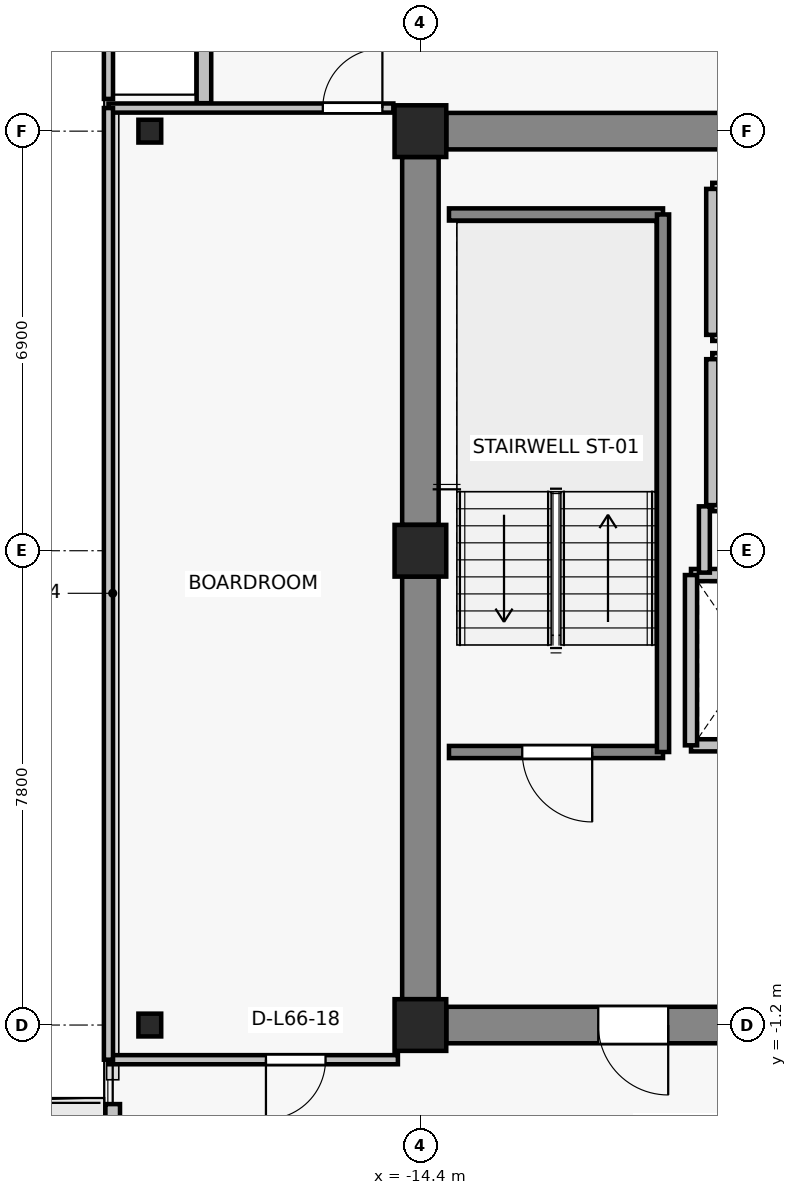
"""IFC4 building model, lengths in metres.
Left out: names, types, materials, properties, quantities, classifications, styles, units other than length and angle.
Written with IfcOpenShell. Run it as: python <this file> out.ifc"""

import sys

from ifc_helpers import new_model, si_unit, direction, frame, frame_2d, origin, origin_2d, place, context, subcontext, project, spatial, rectangle, i_section, extrude, source, transform, mapped, element, fill, save


model = new_model("IFC4")
c1 = context("Model", 3, precision=1e-05, world=origin(), true_north=direction((0.0, 1.0)))
c2 = subcontext(c1, "Body", "Model", "MODEL_VIEW")
j1 = project(units=[si_unit("LENGTHUNIT", "METRE"), si_unit("PLANEANGLEUNIT", "RADIAN")], contexts=[c1])
p1 = place(None, origin())
s1 = spatial("IfcSite", under=j1, at=p1, CompositionType="ELEMENT")
p2 = place(p1, origin())
s2 = spatial("IfcBuilding", under=s1, at=p2, CompositionType="ELEMENT")
p3 = place(p2, frame((0.0, 0.0, 235.3)))
s3 = spatial("IfcBuildingStorey", under=s2, at=p3, CompositionType="ELEMENT", Elevation=235.3)
for number, where, z_axis, x_axis in (
    (1, (-14.4, -1.2, 0.0), (0.0, 0.0, 1.0), (1.0, 0.0, 0.0)),
    (2, (-14.4, 6.6, 0.0), (0.0, 0.0, 1.0), (1.0, 0.0, 0.0)),
    (3, (-14.4, 13.5, 0.0), (0.0, 0.0, 1.0), (1.0, 0.0, 0.0)),
):
    element("IfcColumn", number, at=place(p3, frame(where, z_axis=z_axis, x_axis=x_axis)), inside=s3, PredefinedType="COLUMN", context=c2, shape_type="SweptSolid", body=[
        extrude(rectangle(XDim=0.85, YDim=0.85, at=origin_2d()), origin(), (0.0, 0.0, 1.0), 3.3),
    ])
for number, where, z_axis, x_axis in (
    (4, (-18.85, -1.2, 0.0), (0.0, 0.0, 1.0), (1.0, 0.0, 0.0)),
    (5, (-18.85, 13.5, 0.0), (0.0, 0.0, 1.0), (1.0, 0.0, 0.0)),
):
    element("IfcColumn", number, at=place(p3, frame(where, z_axis=z_axis, x_axis=x_axis)), inside=s3, PredefinedType="COLUMN", context=c2, shape_type="SweptSolid", body=[
        extrude(i_section(OverallWidth=0.375, OverallDepth=0.375, WebThickness=0.017, FlangeThickness=0.027, FilletRadius=0.015, at=origin_2d()), origin(), (0.0, 0.0, 1.0), 3.3),
    ])
p4 = place(p3, frame((-13.975, 13.5, 0.0), z_axis=(0.0, 0.0, 1.0), x_axis=(1.0, 0.0, 0.0)))
e6 = element("IfcWall", 6, at=p4, inside=s3, PredefinedType="SHEAR", context=c2, shape_type="SweptSolid", body=[
    extrude(rectangle(XDim=6.35, YDim=0.6, at=frame_2d((3.175, 0.0))), origin(), (0.0, 0.0, 1.0), 3.075),
])
p5 = place(p3, frame((-14.4, -0.775, 0.0), z_axis=(0.0, 0.0, 1.0), x_axis=(0.0, 1.0, 0.0)))
e7 = element("IfcWall", 7, at=p5, inside=s3, PredefinedType="SHEAR", context=c2, shape_type="SweptSolid", body=[
    extrude(rectangle(XDim=6.95, YDim=0.6, at=frame_2d((3.475, 0.0))), origin(), (0.0, 0.0, 1.0), 3.075),
])
p6 = place(p3, frame((-14.4, 7.025, 0.0), z_axis=(0.0, 0.0, 1.0), x_axis=(0.0, 1.0, 0.0)))
e8 = element("IfcWall", 8, at=p6, inside=s3, PredefinedType="SHEAR", context=c2, shape_type="SweptSolid", body=[
    extrude(rectangle(XDim=6.05, YDim=0.6, at=frame_2d((3.025, 0.0))), origin(), (0.0, 0.0, 1.0), 3.075),
])
p7 = place(p3, frame((-7.625, -1.2, 0.0), z_axis=(0.0, 0.0, 1.0), x_axis=(-1.0, 0.0, 0.0)))
e9 = element("IfcWall", 9, at=p7, inside=s3, PredefinedType="SHEAR", context=c2, shape_type="SweptSolid", body=[
    extrude(rectangle(XDim=6.35, YDim=0.6, at=frame_2d((3.175, 0.0))), origin(), (0.0, 0.0, 1.0), 3.075),
])
p8 = place(p7, frame((2.7, 0.0, 0.0)))
e10 = element("IfcOpeningElement", 10, at=p8, cuts=e9, PredefinedType="OPENING", context=c2, shape_type="SweptSolid", body=[
    extrude(rectangle(XDim=1.15, YDim=2.15, at=frame_2d((0.575, 1.075))), frame((0.0, 0.31, 0.0), z_axis=(0.0, -1.0, 0.0), x_axis=(1.0, 0.0, 0.0)), (0.0, 0.0, 1.0), 0.62),
])
p9 = place(p3, frame((-19.46, -8.3, 0.0), z_axis=(0.0, 0.0, 1.0), x_axis=(0.0, 1.0, 0.0)))
e11 = element("IfcWall", 11, at=p9, inside=s3, PredefinedType="SOLIDWALL", context=c2, shape_type="SweptSolid", body=[
    extrude(rectangle(XDim=5.8, YDim=0.24, at=frame_2d((2.9, 0.0))), origin(), (0.0, 0.0, 1.0), 3.075),
])
p10 = place(p9, frame((0.696, 0.0, 0.0)))
e12 = element("IfcOpeningElement", 12, at=p10, cuts=e11, PredefinedType="OPENING", context=c2, shape_type="SweptSolid", body=[
    extrude(rectangle(XDim=1.0, YDim=2.2, at=frame_2d((0.5, 1.1))), frame((0.0, 0.13, 0.0), z_axis=(0.0, -1.0, 0.0), x_axis=(1.0, 0.0, 0.0)), (0.0, 0.0, 1.0), 0.26),
])
p11 = place(p9, frame((2.046, 0.0, 0.85)))
e13 = element("IfcOpeningElement", 13, at=p11, cuts=e11, PredefinedType="OPENING", context=c2, shape_type="SweptSolid", body=[
    extrude(rectangle(XDim=1.5, YDim=1.6, at=frame_2d((0.75, 0.8))), frame((0.0, 0.13, 0.0), z_axis=(0.0, -1.0, 0.0), x_axis=(1.0, 0.0, 0.0)), (0.0, 0.0, 1.0), 0.26),
])
p12 = place(p3, frame((-17.96, 15.46, 0.0), z_axis=(0.0, 0.0, 1.0), x_axis=(0.0, -1.0, 0.0)))
e14 = element("IfcWall", 14, at=p12, inside=s3, PredefinedType="SOLIDWALL", context=c2, shape_type="SweptSolid", body=[
    extrude(rectangle(XDim=1.5, YDim=0.24, at=frame_2d((0.75, 0.0))), origin(), (0.0, 0.0, 1.0), 3.075),
])
p13 = place(p3, frame((-7.95, 3.4, 0.0), z_axis=(0.0, 0.0, 1.0), x_axis=(-1.0, 0.0, 0.0)))
e15 = element("IfcWall", 15, at=p13, inside=s3, PredefinedType="SOLIDWALL", context=c2, shape_type="SweptSolid", body=[
    extrude(rectangle(XDim=2.0, YDim=0.2, at=frame_2d((1.0, 0.0))), origin(), (0.0, 0.0, 1.0), 3.075),
])
p14 = place(p13, frame((0.45, 0.0, 0.0)))
e16 = element("IfcOpeningElement", 16, at=p14, cuts=e15, PredefinedType="OPENING", context=c2, shape_type="SweptSolid", body=[
    extrude(rectangle(XDim=1.1, YDim=2.2, at=frame_2d((0.55, 1.1))), frame((0.0, 0.11, 0.0), z_axis=(0.0, -1.0, 0.0), x_axis=(1.0, 0.0, 0.0)), (0.0, 0.0, 1.0), 0.22),
])
p15 = place(p3, frame((-9.95, 6.2, 0.0), z_axis=(0.0, 0.0, 1.0), x_axis=(1.0, 0.0, 0.0)))
e17 = element("IfcWall", 17, at=p15, inside=s3, PredefinedType="SOLIDWALL", context=c2, shape_type="SweptSolid", body=[
    extrude(rectangle(XDim=2.0, YDim=0.2, at=frame_2d((1.0, 0.0))), origin(), (0.0, 0.0, 1.0), 3.075),
])
p16 = place(p3, frame((-9.95, 3.4, 0.0), z_axis=(0.0, 0.0, 1.0), x_axis=(0.0, 1.0, 0.0)))
e18 = element("IfcWall", 18, at=p16, inside=s3, PredefinedType="SOLIDWALL", context=c2, shape_type="SweptSolid", body=[
    extrude(rectangle(XDim=2.8, YDim=0.2, at=frame_2d((1.4, 0.0))), origin(), (0.0, 0.0, 1.0), 3.075),
])
for number, where, z_axis, x_axis in (
    (19, (-7.4, 7.35, 0.0), (0.0, 0.0, 1.0), (-1.0, 0.0, 0.0)),
    (20, (-9.6, 9.75, 0.0), (0.0, 0.0, 1.0), (1.0, 0.0, 0.0)),
):
    element("IfcWall", number, at=place(p3, frame(where, z_axis=z_axis, x_axis=x_axis)), inside=s3, PredefinedType="SOLIDWALL", context=c2, shape_type="SweptSolid", body=[
        extrude(rectangle(XDim=2.2, YDim=0.2, at=frame_2d((1.1, 0.0))), origin(), (0.0, 0.0, 1.0), 2.615),
    ])
p17 = place(p3, frame((-9.6, 7.35, 0.0), z_axis=(0.0, 0.0, 1.0), x_axis=(0.0, 1.0, 0.0)))
e21 = element("IfcWall", 21, at=p17, inside=s3, PredefinedType="SOLIDWALL", context=c2, shape_type="SweptSolid", body=[
    extrude(rectangle(XDim=2.4, YDim=0.2, at=frame_2d((1.2, 0.0))), origin(), (0.0, 0.0, 1.0), 3.075),
])
for number, where, z_axis, x_axis in (
    (22, (-7.4, 10.15, 0.0), (0.0, 0.0, 1.0), (-1.0, 0.0, 0.0)),
    (23, (-9.6, 12.55, 0.0), (0.0, 0.0, 1.0), (1.0, 0.0, 0.0)),
):
    element("IfcWall", number, at=place(p3, frame(where, z_axis=z_axis, x_axis=x_axis)), inside=s3, PredefinedType="SOLIDWALL", context=c2, shape_type="SweptSolid", body=[
        extrude(rectangle(XDim=2.2, YDim=0.2, at=frame_2d((1.1, 0.0))), origin(), (0.0, 0.0, 1.0), 2.615),
    ])
p18 = place(p3, frame((-9.6, 10.15, 0.0), z_axis=(0.0, 0.0, 1.0), x_axis=(0.0, 1.0, 0.0)))
e24 = element("IfcWall", 24, at=p18, inside=s3, PredefinedType="SOLIDWALL", context=c2, shape_type="SweptSolid", body=[
    extrude(rectangle(XDim=2.4, YDim=0.2, at=frame_2d((1.2, 0.0))), origin(), (0.0, 0.0, 1.0), 3.075),
])
p19 = place(p3, frame((-10.41, 3.29, 0.0), z_axis=(0.0, 0.0, 1.0), x_axis=(-1.0, 0.0, 0.0)))
e25 = element("IfcWall", 25, at=p19, inside=s3, PredefinedType="SOLIDWALL", context=c2, shape_type="SweptSolid", body=[
    extrude(rectangle(XDim=3.52, YDim=0.2, at=frame_2d((1.76, 0.0))), origin(), (0.0, 0.0, 1.0), 3.075),
])
p20 = place(p19, frame((1.165, 0.0, 0.0)))
e26 = element("IfcOpeningElement", 26, at=p20, cuts=e25, PredefinedType="OPENING", context=c2, shape_type="SweptSolid", body=[
    extrude(rectangle(XDim=1.15, YDim=2.15, at=frame_2d((0.575, 1.075))), frame((0.0, 0.11, 0.0), z_axis=(0.0, -1.0, 0.0), x_axis=(1.0, 0.0, 0.0)), (0.0, 0.0, 1.0), 0.22),
])
p21 = place(p3, frame((-13.93, 12.13, 0.0), z_axis=(0.0, 0.0, 1.0), x_axis=(1.0, 0.0, 0.0)))
e27 = element("IfcWall", 27, at=p21, inside=s3, PredefinedType="SOLIDWALL", context=c2, shape_type="SweptSolid", body=[
    extrude(rectangle(XDim=3.52, YDim=0.2, at=frame_2d((1.76, 0.0))), origin(), (0.0, 0.0, 1.0), 3.075),
])
p22 = place(p3, frame((-10.41, 12.13, 0.0), z_axis=(0.0, 0.0, 1.0), x_axis=(0.0, -1.0, 0.0)))
e28 = element("IfcWall", 28, at=p22, inside=s3, PredefinedType="SOLIDWALL", context=c2, shape_type="SweptSolid", body=[
    extrude(rectangle(XDim=8.84, YDim=0.2, at=frame_2d((4.42, 0.0))), origin(), (0.0, 0.0, 1.0), 3.075),
])
p23 = place(p3, frame((-9.73, 6.24, 0.0), z_axis=(0.0, 0.0, 1.0), x_axis=(0.0, 1.0, 0.0)))
e29 = element("IfcWall", 29, at=p23, inside=s3, PredefinedType="PARTITIONING", context=c2, shape_type="SweptSolid", body=[
    extrude(rectangle(XDim=1.09, YDim=0.18, at=frame_2d((0.545, 0.0))), origin(), (0.0, 0.0, 1.0), 3.075),
])
p24 = place(p3, frame((-14.77, -1.77, 0.0), z_axis=(0.0, 0.0, 1.0), x_axis=(-1.0, 0.0, 0.0)))
e30 = element("IfcWall", 30, at=p24, inside=s3, PredefinedType="PARTITIONING", context=c2, shape_type="SweptSolid", body=[
    extrude(rectangle(XDim=4.76, YDim=0.15, at=frame_2d((2.38, 0.0))), origin(), (0.0, 0.0, 1.0), 2.765),
])
p25 = place(p24, frame((1.19, 0.0, 0.0)))
e31 = element("IfcOpeningElement", 31, at=p25, cuts=e30, PredefinedType="OPENING", context=c2, shape_type="SweptSolid", body=[
    extrude(rectangle(XDim=0.98, YDim=2.15, at=frame_2d((0.49, 1.075))), frame((0.0, 0.085, 0.0), z_axis=(0.0, -1.0, 0.0), x_axis=(1.0, 0.0, 0.0)), (0.0, 0.0, 1.0), 0.17),
])
p26 = place(p3, frame((-19.53, 13.88, 0.0), z_axis=(0.0, 0.0, 1.0), x_axis=(1.0, 0.0, 0.0)))
e32 = element("IfcWall", 32, at=p26, inside=s3, PredefinedType="PARTITIONING", context=c2, shape_type="SweptSolid", body=[
    extrude(rectangle(XDim=4.685, YDim=0.15, at=frame_2d((2.343, 0.0))), origin(), (0.0, 0.0, 1.0), 3.075),
])
p27 = place(p26, frame((3.525, 0.0, 0.0)))
e33 = element("IfcOpeningElement", 33, at=p27, cuts=e32, PredefinedType="OPENING", context=c2, shape_type="SweptSolid", body=[
    extrude(rectangle(XDim=0.98, YDim=2.15, at=frame_2d((0.49, 1.075))), frame((0.0, 0.085, 0.0), z_axis=(0.0, -1.0, 0.0), x_axis=(1.0, 0.0, 0.0)), (0.0, 0.0, 1.0), 0.17),
])
p28 = place(p3, frame((-19.53, -1.77, 0.0), z_axis=(0.0, 0.0, 1.0), x_axis=(0.0, 1.0, 0.0)))
e34 = element("IfcWall", 34, at=p28, inside=s3, PredefinedType="PARTITIONING", context=c2, shape_type="SweptSolid", body=[
    extrude(rectangle(XDim=15.65, YDim=0.15, at=frame_2d((7.825, 0.0))), origin(), (0.0, 0.0, 1.0), 3.075),
])
p29 = place(p3, frame((-19.53, 14.03, 0.0), z_axis=(0.0, 0.0, 1.0), x_axis=(0.0, 1.0, 0.0)))
e35 = element("IfcWall", 35, at=p29, inside=s3, PredefinedType="PARTITIONING", context=c2, shape_type="SweptSolid", body=[
    extrude(rectangle(XDim=3.0, YDim=0.15, at=frame_2d((1.5, 0.0))), origin(), (0.0, 0.0, 1.0), 3.075),
])
m1 = source(origin(), c2, "Body", "SweptSolid", [
    extrude(rectangle(XDim=1.15, YDim=2.15, at=frame_2d((0.575, 1.075))), frame((0.0, 0.025, 0.0), z_axis=(0.0, -1.0, 0.0), x_axis=(1.0, 0.0, 0.0)), (0.0, 0.0, 1.0), 0.05),
])
p30 = place(p20, origin())
e36 = element("IfcDoor", 36, at=p30, inside=s3, OperationType="SINGLE_SWING_LEFT", PredefinedType="DOOR", context=c2, shape_type="MappedRepresentation", body=[
    mapped(m1, transform((0.0, 0.0, 0.0), x_axis=(1.0, 0.0, 0.0), y_axis=(0.0, 1.0, 0.0), z_axis=(0.0, 0.0, 1.0), scale=1.0)),
])
fill(e26, e36)
p31 = place(p8, origin())
e37 = element("IfcDoor", 37, at=p31, inside=s3, OperationType="SINGLE_SWING_LEFT", PredefinedType="DOOR", context=c2, shape_type="MappedRepresentation", body=[
    mapped(m1, transform((0.0, 0.0, 0.0), x_axis=(1.0, 0.0, 0.0), y_axis=(0.0, 1.0, 0.0), z_axis=(0.0, 0.0, 1.0), scale=1.0)),
])
fill(e10, e37)
m2 = source(origin(), c2, "Body", "SweptSolid", [
    extrude(rectangle(XDim=0.98, YDim=2.15, at=frame_2d((0.49, 1.075))), frame((0.0, 0.025, 0.0), z_axis=(0.0, -1.0, 0.0), x_axis=(1.0, 0.0, 0.0)), (0.0, 0.0, 1.0), 0.05),
])
p32 = place(p25, origin())
e38 = element("IfcDoor", 38, at=p32, inside=s3, OperationType="SINGLE_SWING_RIGHT", PredefinedType="DOOR", context=c2, shape_type="MappedRepresentation", body=[
    mapped(m2, transform((0.0, 0.0, 0.0), x_axis=(1.0, 0.0, 0.0), y_axis=(0.0, 1.0, 0.0), z_axis=(0.0, 0.0, 1.0), scale=1.0)),
])
fill(e31, e38)
p33 = place(p27, origin())
e39 = element("IfcDoor", 39, at=p33, inside=s3, OperationType="SINGLE_SWING_RIGHT", PredefinedType="DOOR", context=c2, shape_type="MappedRepresentation", body=[
    mapped(m2, transform((0.0, 0.0, 0.0), x_axis=(1.0, 0.0, 0.0), y_axis=(0.0, 1.0, 0.0), z_axis=(0.0, 0.0, 1.0), scale=1.0)),
])
fill(e33, e39)
save(model, sys.argv[1])
